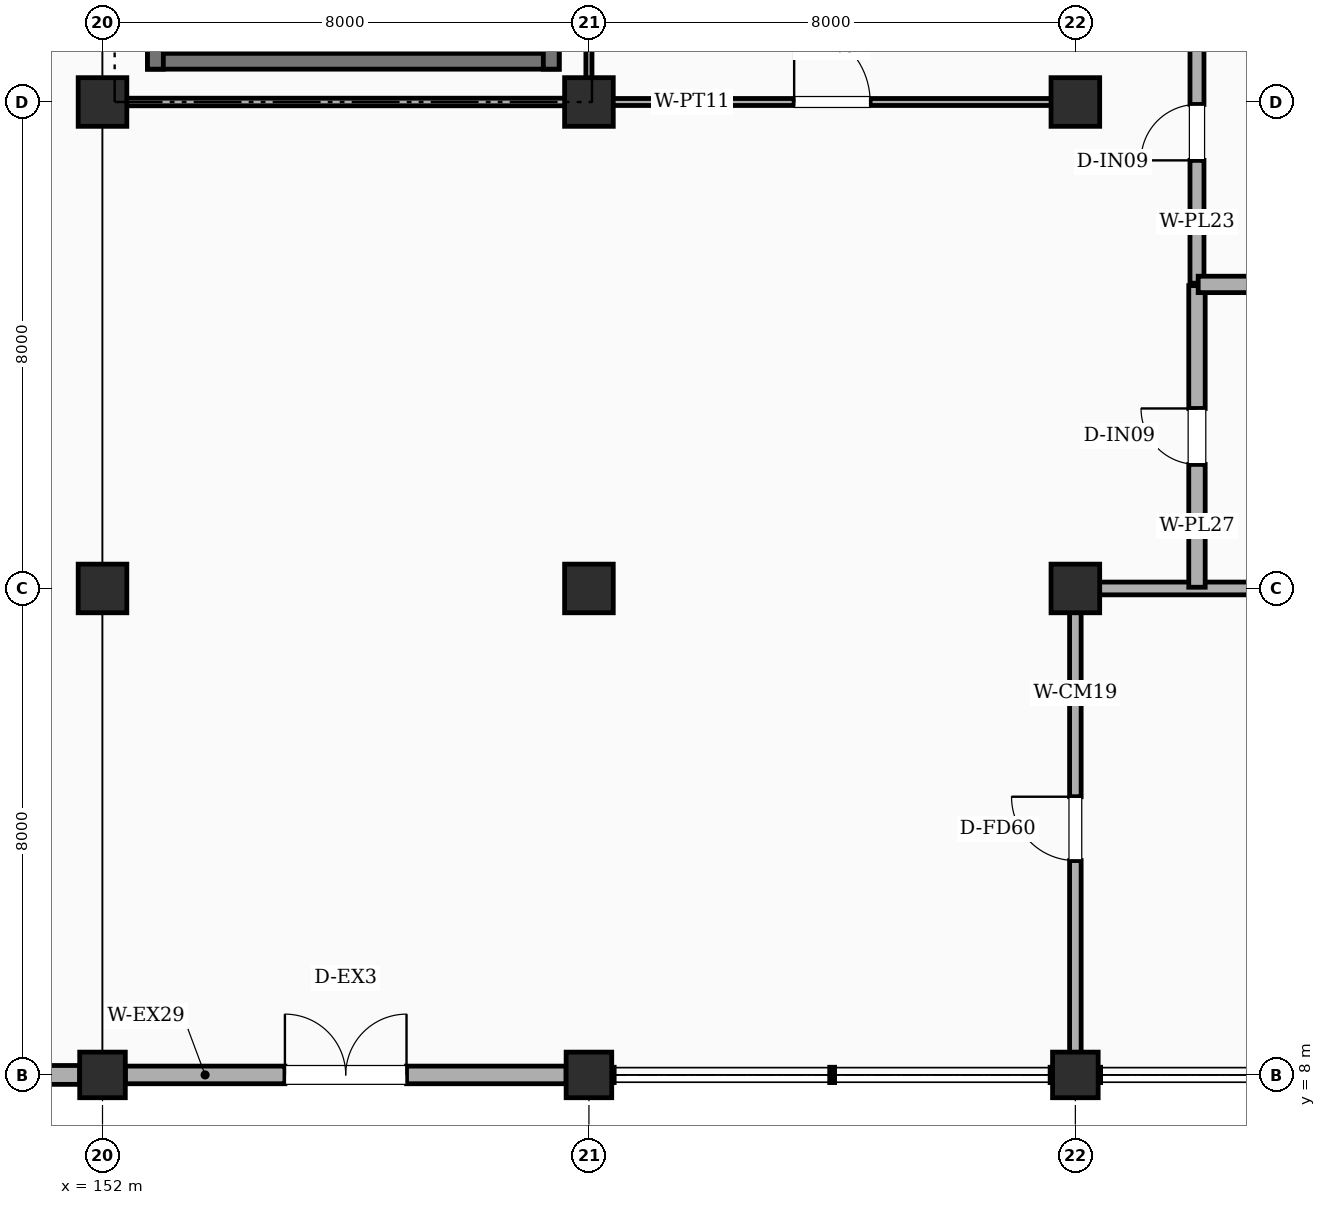
"""IFC4 building model, lengths in metres.
Left out: names, types, materials, properties, quantities, classifications, styles, units other than length and angle.
Written with IfcOpenShell. Run it as: python <this file> out.ifc"""

import sys

from ifc_helpers import new_model, si_unit, direction, frame, frame_2d, origin, origin_2d, place, context, subcontext, project, spatial, rectangle, extrude, element, fill, save


model = new_model("IFC4")
c1 = context("Model", 3, precision=1e-05, world=origin(), true_north=direction((0.0, 1.0)))
c2 = subcontext(c1, "Body", "Model", "MODEL_VIEW")
j1 = project(units=[si_unit("LENGTHUNIT", "METRE"), si_unit("PLANEANGLEUNIT", "RADIAN")], contexts=[c1])
p1 = place(None, origin())
s1 = spatial("IfcSite", under=j1, at=p1, CompositionType="ELEMENT")
p2 = place(p1, origin())
s2 = spatial("IfcBuilding", under=s1, at=p2, CompositionType="ELEMENT")
p3 = place(p2, origin())
s3 = spatial("IfcBuildingStorey", under=s2, at=p3, CompositionType="ELEMENT", Elevation=0.0)
p4 = place(p3, frame((152.0, 8.0, 0.0), z_axis=(0.0, 0.0, 1.0), x_axis=(1.0, 0.0, 0.0)))
e1 = element("IfcColumn", 1, at=p4, inside=s3, PredefinedType="COLUMN", context=c2, shape_type="SweptSolid", body=[
    extrude(rectangle(XDim=0.75, YDim=0.75, at=origin_2d()), origin(), (0.0, 0.0, 1.0), 5.4),
])
for number, where, z_axis, x_axis in (
    (2, (152.0, 16.0, 0.0), (0.0, 0.0, 1.0), (1.0, 0.0, 0.0)),
    (3, (152.0, 24.0, 0.0), (0.0, 0.0, 1.0), (1.0, 0.0, 0.0)),
):
    element("IfcColumn", number, at=place(p3, frame(where, z_axis=z_axis, x_axis=x_axis)), inside=s3, PredefinedType="COLUMN", context=c2, shape_type="SweptSolid", body=[
        extrude(rectangle(XDim=0.8, YDim=0.8, at=origin_2d()), origin(), (0.0, 0.0, 1.0), 5.4),
    ])
p5 = place(p3, frame((160.0, 8.0, 0.0), z_axis=(0.0, 0.0, 1.0), x_axis=(1.0, 0.0, 0.0)))
e4 = element("IfcColumn", 4, at=p5, inside=s3, PredefinedType="COLUMN", context=c2, shape_type="SweptSolid", body=[
    extrude(rectangle(XDim=0.75, YDim=0.75, at=origin_2d()), origin(), (0.0, 0.0, 1.0), 5.4),
])
for number, where, z_axis, x_axis in (
    (5, (160.0, 16.0, 0.0), (0.0, 0.0, 1.0), (1.0, 0.0, 0.0)),
    (6, (160.0, 24.0, 0.0), (0.0, 0.0, 1.0), (1.0, 0.0, 0.0)),
):
    element("IfcColumn", number, at=place(p3, frame(where, z_axis=z_axis, x_axis=x_axis)), inside=s3, PredefinedType="COLUMN", context=c2, shape_type="SweptSolid", body=[
        extrude(rectangle(XDim=0.8, YDim=0.8, at=origin_2d()), origin(), (0.0, 0.0, 1.0), 5.4),
    ])
p6 = place(p3, frame((168.0, 8.0, 0.0), z_axis=(0.0, 0.0, 1.0), x_axis=(1.0, 0.0, 0.0)))
e7 = element("IfcColumn", 7, at=p6, inside=s3, PredefinedType="COLUMN", context=c2, shape_type="SweptSolid", body=[
    extrude(rectangle(XDim=0.75, YDim=0.75, at=origin_2d()), origin(), (0.0, 0.0, 1.0), 5.4),
])
for number, where, z_axis, x_axis in (
    (8, (168.0, 16.0, 0.0), (0.0, 0.0, 1.0), (1.0, 0.0, 0.0)),
    (9, (168.0, 24.0, 0.0), (0.0, 0.0, 1.0), (1.0, 0.0, 0.0)),
):
    element("IfcColumn", number, at=place(p3, frame(where, z_axis=z_axis, x_axis=x_axis)), inside=s3, PredefinedType="COLUMN", context=c2, shape_type="SweptSolid", body=[
        extrude(rectangle(XDim=0.8, YDim=0.8, at=origin_2d()), origin(), (0.0, 0.0, 1.0), 5.4),
    ])
p7 = place(p3, frame((144.375, 8.0, 0.0), z_axis=(0.0, 0.0, 1.0), x_axis=(1.0, 0.0, 0.0)))
e10 = element("IfcWall", 10, at=p7, inside=s3, PredefinedType="STANDARD", context=c2, shape_type="SweptSolid", body=[
    extrude(rectangle(XDim=7.25, YDim=0.31, at=frame_2d((3.625, 0.0))), origin(), (0.0, 0.0, 1.0), 5.1),
])
p8 = place(p7, frame((2.625, 0.0, 0.0)))
e11 = element("IfcOpeningElement", 11, at=p8, cuts=e10, PredefinedType="OPENING", context=c2, shape_type="SweptSolid", body=[
    extrude(rectangle(XDim=2.0, YDim=2.4, at=frame_2d((1.0, 1.2))), frame((0.0, 0.165, 0.0), z_axis=(0.0, -1.0, 0.0), x_axis=(1.0, 0.0, 0.0)), (0.0, 0.0, 1.0), 0.33),
])
p9 = place(p3, frame((152.375, 8.0, 0.0), z_axis=(0.0, 0.0, 1.0), x_axis=(1.0, 0.0, 0.0)))
e12 = element("IfcWall", 12, at=p9, inside=s3, PredefinedType="STANDARD", context=c2, shape_type="SweptSolid", body=[
    extrude(rectangle(XDim=7.25, YDim=0.29, at=frame_2d((3.625, 0.0))), origin(), (0.0, 0.0, 1.0), 4.42),
])
p10 = place(p9, frame((2.625, 0.0, 0.0)))
e13 = element("IfcOpeningElement", 13, at=p10, cuts=e12, PredefinedType="OPENING", context=c2, shape_type="SweptSolid", body=[
    extrude(rectangle(XDim=2.0, YDim=2.4, at=frame_2d((1.0, 1.2))), frame((0.0, 0.155, 0.0), z_axis=(0.0, -1.0, 0.0), x_axis=(1.0, 0.0, 0.0)), (0.0, 0.0, 1.0), 0.31),
])
p11 = place(p3, frame((159.51, 24.67, 0.0), z_axis=(0.0, 0.0, 1.0), x_axis=(-1.0, 0.0, 0.0)))
e14 = element("IfcWall", 14, at=p11, inside=s3, PredefinedType="SHEAR", context=c2, shape_type="SweptSolid", body=[
    extrude(rectangle(XDim=6.77, YDim=0.26, at=frame_2d((3.385, 0.0))), origin(), (0.0, 0.0, 1.0), 5.4),
])
p12 = place(p3, frame((152.87, 24.54, 0.0), z_axis=(0.0, 0.0, 1.0), x_axis=(0.0, 1.0, 0.0)))
e15 = element("IfcWall", 15, at=p12, inside=s3, PredefinedType="SHEAR", context=c2, shape_type="SweptSolid", body=[
    extrude(rectangle(XDim=3.86, YDim=0.26, at=frame_2d((1.93, 0.0))), origin(), (0.0, 0.0, 1.0), 5.4),
])
p13 = place(p12, frame((1.46, 0.0, 0.0)))
e16 = element("IfcOpeningElement", 16, at=p13, cuts=e15, PredefinedType="OPENING", context=c2, shape_type="SweptSolid", body=[
    extrude(rectangle(XDim=1.7, YDim=2.2, at=frame_2d((0.85, 1.1))), frame((0.0, 0.14, 0.0), z_axis=(0.0, -1.0, 0.0), x_axis=(1.0, 0.0, 0.0)), (0.0, 0.0, 1.0), 0.28),
])
p14 = place(p3, frame((159.38, 24.54, 0.0), z_axis=(0.0, 0.0, 1.0), x_axis=(0.0, 1.0, 0.0)))
e17 = element("IfcWall", 17, at=p14, inside=s3, PredefinedType="SHEAR", context=c2, shape_type="SweptSolid", body=[
    extrude(rectangle(XDim=3.86, YDim=0.26, at=frame_2d((1.93, 0.0))), origin(), (0.0, 0.0, 1.0), 5.4),
])
p15 = place(p3, frame((168.0, 8.12, 0.0), z_axis=(0.0, 0.0, 1.0), x_axis=(0.0, 1.0, 0.0)))
e18 = element("IfcWall", 18, at=p15, inside=s3, PredefinedType="SOLIDWALL", context=c2, shape_type="SweptSolid", body=[
    extrude(rectangle(XDim=7.86, YDim=0.19, at=frame_2d((3.93, 0.0))), origin(), (0.0, 0.0, 1.0), 4.27),
])
p16 = place(p15, frame((3.405, 0.0, 0.0)))
e19 = element("IfcOpeningElement", 19, at=p16, cuts=e18, PredefinedType="OPENING", context=c2, shape_type="SweptSolid", body=[
    extrude(rectangle(XDim=1.05, YDim=2.15, at=frame_2d((0.525, 1.075))), frame((0.0, 0.105, 0.0), z_axis=(0.0, -1.0, 0.0), x_axis=(1.0, 0.0, 0.0)), (0.0, 0.0, 1.0), 0.21),
])
p17 = place(p3, frame((168.02, 16.0, 0.0), z_axis=(0.0, 0.0, 1.0), x_axis=(1.0, 0.0, 0.0)))
e20 = element("IfcWall", 20, at=p17, inside=s3, PredefinedType="SOLIDWALL", context=c2, shape_type="SweptSolid", body=[
    extrude(rectangle(XDim=7.86, YDim=0.21, at=frame_2d((3.93, 0.0))), origin(), (0.0, 0.0, 1.0), 4.27),
])
p18 = place(p3, frame((152.22, 24.0, 0.0), z_axis=(0.0, 0.0, 1.0), x_axis=(1.0, 0.0, 0.0)))
e21 = element("IfcWall", 21, at=p18, inside=s3, PredefinedType="PARTITIONING", context=c2, shape_type="SweptSolid", body=[
    extrude(rectangle(XDim=7.76, YDim=0.125, at=frame_2d((3.88, 0.0))), origin(), (0.0, 0.0, 1.0), 4.27),
])
p19 = place(p3, frame((160.02, 24.0, 0.0), z_axis=(0.0, 0.0, 1.0), x_axis=(1.0, 0.0, 0.0)))
e22 = element("IfcWall", 22, at=p19, inside=s3, PredefinedType="PARTITIONING", context=c2, shape_type="SweptSolid", body=[
    extrude(rectangle(XDim=7.96, YDim=0.115, at=frame_2d((3.98, 0.0))), origin(), (0.0, 0.0, 1.0), 4.27),
])
p20 = place(p19, frame((3.355, 0.0, 0.0)))
e23 = element("IfcOpeningElement", 23, at=p20, cuts=e22, PredefinedType="OPENING", context=c2, shape_type="SweptSolid", body=[
    extrude(rectangle(XDim=1.25, YDim=2.15, at=frame_2d((0.625, 1.075))), frame((0.0, 0.067, 0.0), z_axis=(0.0, -1.0, 0.0), x_axis=(1.0, 0.0, 0.0)), (0.0, 0.0, 1.0), 0.135),
])
p21 = place(p3, frame((160.0, 24.02, 0.0), z_axis=(0.0, 0.0, 1.0), x_axis=(0.0, 1.0, 0.0)))
e24 = element("IfcWall", 24, at=p21, inside=s3, PredefinedType="PARTITIONING", context=c2, shape_type="SweptSolid", body=[
    extrude(rectangle(XDim=19.16, YDim=0.1, at=frame_2d((9.58, 0.0))), origin(), (0.0, 0.0, 1.0), 4.27),
])
p22 = place(p3, frame((170.0, 16.02, 0.0), z_axis=(0.0, 0.0, 1.0), x_axis=(0.0, 1.0, 0.0)))
e25 = element("IfcWall", 25, at=p22, inside=s3, PredefinedType="PLUMBINGWALL", context=c2, shape_type="SweptSolid", body=[
    extrude(rectangle(XDim=4.96, YDim=0.27, at=frame_2d((2.48, 0.0))), origin(), (0.0, 0.0, 1.0), 4.27),
])
p23 = place(p22, frame((2.02, 0.0, 0.0)))
e26 = element("IfcOpeningElement", 26, at=p23, cuts=e25, PredefinedType="OPENING", context=c2, shape_type="SweptSolid", body=[
    extrude(rectangle(XDim=0.92, YDim=2.1, at=frame_2d((0.46, 1.05))), frame((0.0, 0.145, 0.0), z_axis=(0.0, -1.0, 0.0), x_axis=(1.0, 0.0, 0.0)), (0.0, 0.0, 1.0), 0.29),
])
p24 = place(p3, frame((170.0, 21.02, 0.0), z_axis=(0.0, 0.0, 1.0), x_axis=(0.0, 1.0, 0.0)))
e27 = element("IfcWall", 27, at=p24, inside=s3, PredefinedType="PLUMBINGWALL", context=c2, shape_type="SweptSolid", body=[
    extrude(rectangle(XDim=4.96, YDim=0.23, at=frame_2d((2.48, 0.0))), origin(), (0.0, 0.0, 1.0), 4.27),
])
p25 = place(p24, frame((2.02, 0.0, 0.0)))
e28 = element("IfcOpeningElement", 28, at=p25, cuts=e27, PredefinedType="OPENING", context=c2, shape_type="SweptSolid", body=[
    extrude(rectangle(XDim=0.92, YDim=2.1, at=frame_2d((0.46, 1.05))), frame((0.0, 0.125, 0.0), z_axis=(0.0, -1.0, 0.0), x_axis=(1.0, 0.0, 0.0)), (0.0, 0.0, 1.0), 0.25),
])
p26 = place(p3, frame((170.02, 21.0, 0.0), z_axis=(0.0, 0.0, 1.0), x_axis=(1.0, 0.0, 0.0)))
e29 = element("IfcWall", 29, at=p26, inside=s3, PredefinedType="PLUMBINGWALL", context=c2, shape_type="SweptSolid", body=[
    extrude(rectangle(XDim=5.86, YDim=0.27, at=frame_2d((2.93, 0.0))), origin(), (0.0, 0.0, 1.0), 4.42),
])
p27 = place(p10, frame((2.0, 0.0, 0.0), z_axis=(0.0, 0.0, 1.0), x_axis=(-1.0, 0.0, 0.0)))
e30 = element("IfcDoor", 30, at=p27, inside=s3, OperationType="DOUBLE_DOOR_SINGLE_SWING", PredefinedType="DOOR", context=c2, shape_type="SweptSolid", body=[
    extrude(rectangle(XDim=2.0, YDim=2.4, at=frame_2d((-1.0, 1.2))), frame((0.0, -0.025, 0.0), z_axis=(0.0, 1.0, 0.0), x_axis=(-1.0, 0.0, 0.0)), (0.0, 0.0, 1.0), 0.05),
])
fill(e13, e30)
p28 = place(p16, origin())
e31 = element("IfcDoor", 31, at=p28, inside=s3, OperationType="SINGLE_SWING_RIGHT", PredefinedType="DOOR", context=c2, shape_type="SweptSolid", body=[
    extrude(rectangle(XDim=1.05, YDim=2.15, at=frame_2d((0.525, 1.075))), frame((0.0, 0.025, 0.0), z_axis=(0.0, -1.0, 0.0), x_axis=(1.0, 0.0, 0.0)), (0.0, 0.0, 1.0), 0.05),
])
fill(e19, e31)
p29 = place(p20, origin())
e32 = element("IfcDoor", 32, at=p29, inside=s3, OperationType="SINGLE_SWING_LEFT", PredefinedType="DOOR", context=c2, shape_type="SweptSolid", body=[
    extrude(rectangle(XDim=1.25, YDim=2.15, at=frame_2d((0.625, 1.075))), frame((0.0, 0.025, 0.0), z_axis=(0.0, -1.0, 0.0), x_axis=(1.0, 0.0, 0.0)), (0.0, 0.0, 1.0), 0.05),
])
fill(e23, e32)
p30 = place(p23, origin())
e33 = element("IfcDoor", 33, at=p30, inside=s3, OperationType="SINGLE_SWING_RIGHT", PredefinedType="DOOR", context=c2, shape_type="SweptSolid", body=[
    extrude(rectangle(XDim=0.92, YDim=2.1, at=frame_2d((0.46, 1.05))), frame((0.0, 0.025, 0.0), z_axis=(0.0, -1.0, 0.0), x_axis=(1.0, 0.0, 0.0)), (0.0, 0.0, 1.0), 0.05),
])
fill(e26, e33)
p31 = place(p25, origin())
e34 = element("IfcDoor", 34, at=p31, inside=s3, OperationType="SINGLE_SWING_LEFT", PredefinedType="DOOR", context=c2, shape_type="SweptSolid", body=[
    extrude(rectangle(XDim=0.92, YDim=2.1, at=frame_2d((0.46, 1.05))), frame((0.0, 0.025, 0.0), z_axis=(0.0, -1.0, 0.0), x_axis=(1.0, 0.0, 0.0)), (0.0, 0.0, 1.0), 0.05),
])
fill(e28, e34)
save(model, sys.argv[1])
